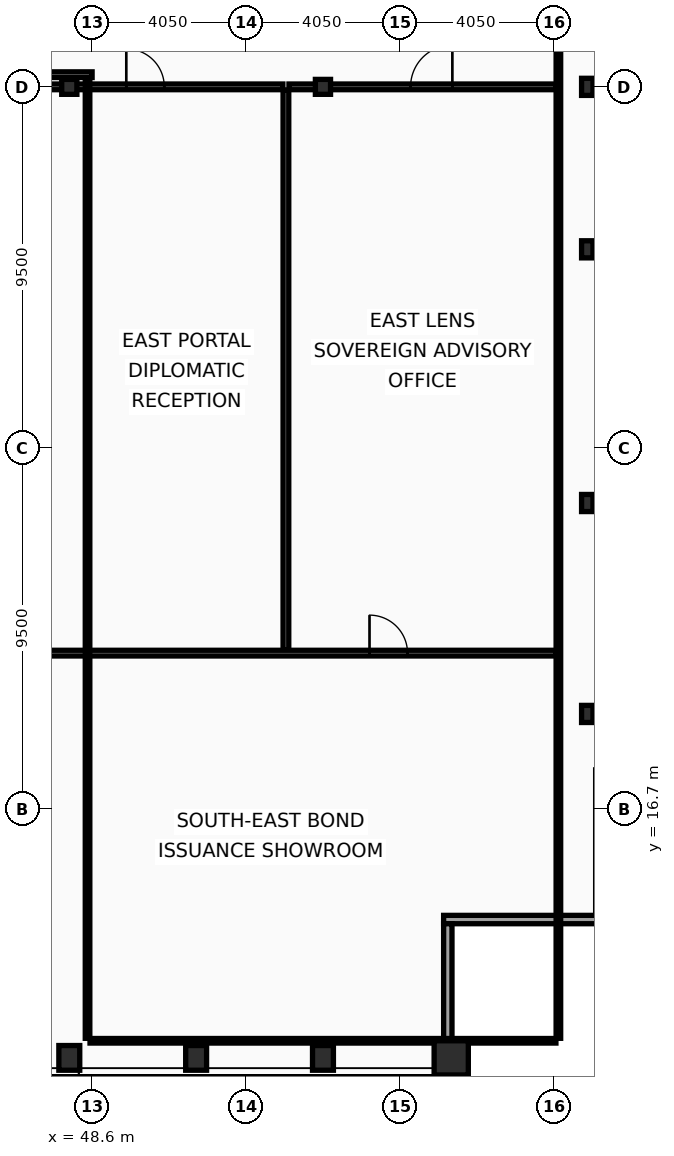
"""IFC4 building model, lengths in metres.
Left out: names, types, materials, properties, quantities, classifications, styles, units other than length and angle.
Written with IfcOpenShell. Run it as: python <this file> out.ifc"""

import sys

from ifc_helpers import new_model, si_unit, direction, frame, frame_2d, origin, origin_2d, place, context, subcontext, project, spatial, rectangle, hollow_rectangle, i_section, extrude, element, fill, save


model = new_model("IFC4")
c1 = context("Model", 3, precision=1e-05, world=origin(), true_north=direction((0.0, 1.0)))
c2 = subcontext(c1, "Body", "Model", "MODEL_VIEW")
j1 = project(units=[si_unit("LENGTHUNIT", "METRE"), si_unit("PLANEANGLEUNIT", "RADIAN")], contexts=[c1])
p1 = place(None, origin())
s1 = spatial("IfcSite", under=j1, at=p1, CompositionType="ELEMENT")
p2 = place(p1, origin())
s2 = spatial("IfcBuilding", under=s1, at=p2, CompositionType="ELEMENT")
p3 = place(p2, frame((0.0, 0.0, 310.2)))
s3 = spatial("IfcBuildingStorey", under=s2, at=p3, CompositionType="ELEMENT", Elevation=310.2)
p4 = place(p3, frame((58.05, 10.15, 0.0), z_axis=(0.0, 0.0, 1.0), x_axis=(1.0, 0.0, 0.0)))
e1 = element("IfcColumn", 1, at=p4, inside=s3, PredefinedType="COLUMN", context=c2, shape_type="SweptSolid", body=[
    extrude(hollow_rectangle(XDim=0.9, YDim=0.9, WallThickness=0.05, at=origin_2d()), origin(), (0.0, 0.0, 1.0), 4.4),
])
for number, where, z_axis, x_axis in (
    (2, (48.0, 10.15, 0.0), (0.0, 0.0, 1.0), (1.0, 0.0, 0.0)),
    (3, (51.337, 10.15, 0.0), (0.0, 0.0, 1.0), (1.0, 0.0, 0.0)),
    (4, (54.675, 10.15, 0.0), (0.0, 0.0, 1.0), (1.0, 0.0, 0.0)),
):
    element("IfcColumn", number, at=place(p3, frame(where, z_axis=z_axis, x_axis=x_axis)), inside=s3, PredefinedType="COLUMN", context=c2, shape_type="SweptSolid", body=[
        extrude(hollow_rectangle(XDim=0.55, YDim=0.65, WallThickness=0.04, at=origin_2d()), origin(), (0.0, 0.0, 1.0), 4.4),
    ])
for number, where, z_axis, x_axis in (
    (5, (61.63, 19.2, 0.0), (0.0, 0.0, 1.0), (1.0, 0.0, 0.0)),
    (6, (61.63, 24.75, 0.0), (0.0, 0.0, 1.0), (1.0, 0.0, 0.0)),
    (7, (61.63, 31.425, 0.0), (0.0, 0.0, 1.0), (1.0, 0.0, 0.0)),
    (8, (61.63, 35.7, 0.0), (0.0, 0.0, 1.0), (1.0, 0.0, 0.0)),
):
    element("IfcColumn", number, at=place(p3, frame(where, z_axis=z_axis, x_axis=x_axis)), inside=s3, PredefinedType="COLUMN", context=c2, shape_type="SweptSolid", body=[
        extrude(i_section(OverallWidth=0.3, OverallDepth=0.45, WebThickness=0.014, FlangeThickness=0.026, at=origin_2d()), origin(), (0.0, 0.0, 1.0), 4.4),
    ])
for number, where, z_axis, x_axis in (
    (9, (48.0, 35.7, 0.0), (0.0, 0.0, 1.0), (1.0, 0.0, 0.0)),
    (10, (54.675, 35.7, 0.0), (0.0, 0.0, 1.0), (1.0, 0.0, 0.0)),
):
    element("IfcColumn", number, at=place(p3, frame(where, z_axis=z_axis, x_axis=x_axis)), inside=s3, PredefinedType="COLUMN", context=c2, shape_type="SweptSolid", body=[
        extrude(i_section(OverallWidth=0.399, OverallDepth=0.393, WebThickness=0.023, FlangeThickness=0.037, at=origin_2d()), origin(), (0.0, 0.0, 1.0), 4.4),
    ])
p5 = place(p3, frame((62.07, 13.79, 0.0), z_axis=(0.0, 0.0, 1.0), x_axis=(-1.0, 0.0, 0.0)))
e11 = element("IfcWall", 11, at=p5, inside=s3, PredefinedType="SOLIDWALL", context=c2, shape_type="SweptSolid", body=[
    extrude(rectangle(XDim=4.22, YDim=0.22, at=frame_2d((2.11, 0.0))), origin(), (0.0, 0.0, 1.0), 3.68),
])
p6 = place(p3, frame((57.96, 13.68, 0.0), z_axis=(0.0, 0.0, 1.0), x_axis=(0.0, -1.0, 0.0)))
e12 = element("IfcWall", 12, at=p6, inside=s3, PredefinedType="SOLIDWALL", context=c2, shape_type="SweptSolid", body=[
    extrude(rectangle(XDim=3.91, YDim=0.22, at=frame_2d((1.955, 0.0))), origin(), (0.0, 0.0, 1.0), 3.68),
])
p7 = place(p3, frame((46.7, 35.7, 0.0), z_axis=(0.0, 0.0, 1.0), x_axis=(1.0, 0.0, 0.0)))
e13 = element("IfcWall", 13, at=p7, inside=s3, PredefinedType="PARTITIONING", context=c2, shape_type="SweptSolid", body=[
    extrude(rectangle(XDim=6.92, YDim=0.15, at=frame_2d((3.46, 0.0))), origin(), (0.0, 0.0, 1.0), 3.63),
])
p8 = place(p7, frame((2.8, 0.0, 0.0)))
e14 = element("IfcOpeningElement", 14, at=p8, cuts=e13, PredefinedType="OPENING", context=c2, shape_type="SweptSolid", body=[
    extrude(rectangle(XDim=1.0, YDim=2.05, at=frame_2d((0.5, 1.025))), frame((0.0, 0.085, 0.0), z_axis=(0.0, -1.0, 0.0), x_axis=(1.0, 0.0, 0.0)), (0.0, 0.0, 1.0), 0.17),
])
p9 = place(p3, frame((53.78, 35.7, 0.0), z_axis=(0.0, 0.0, 1.0), x_axis=(1.0, 0.0, 0.0)))
e15 = element("IfcWall", 15, at=p9, inside=s3, PredefinedType="PARTITIONING", context=c2, shape_type="SweptSolid", body=[
    extrude(rectangle(XDim=7.025, YDim=0.15, at=frame_2d((3.512, 0.0))), origin(), (0.0, 0.0, 1.0), 3.63),
])
p10 = place(p9, frame((3.2, 0.0, 0.0)))
e16 = element("IfcOpeningElement", 16, at=p10, cuts=e15, PredefinedType="OPENING", context=c2, shape_type="SweptSolid", body=[
    extrude(rectangle(XDim=1.1, YDim=2.1, at=frame_2d((0.55, 1.05))), frame((0.0, 0.085, 0.0), z_axis=(0.0, -1.0, 0.0), x_axis=(1.0, 0.0, 0.0)), (0.0, 0.0, 1.0), 0.17),
])
p11 = place(p3, frame((53.7, 20.88, 0.0), z_axis=(0.0, 0.0, 1.0), x_axis=(0.0, 1.0, 0.0)))
e17 = element("IfcWall", 17, at=p11, inside=s3, PredefinedType="PARTITIONING", context=c2, shape_type="SweptSolid", body=[
    extrude(rectangle(XDim=14.74, YDim=0.15, at=frame_2d((7.37, 0.0))), origin(), (0.0, 0.0, 1.0), 3.87),
])
p12 = place(p3, frame((46.7, 20.8, 0.0), z_axis=(0.0, 0.0, 1.0), x_axis=(1.0, 0.0, 0.0)))
e18 = element("IfcWall", 18, at=p12, inside=s3, PredefinedType="PARTITIONING", context=c2, shape_type="SweptSolid", body=[
    extrude(rectangle(XDim=14.105, YDim=0.15, at=frame_2d((7.052, 0.0))), origin(), (0.0, 0.0, 1.0), 3.63),
])
p13 = place(p12, frame((9.2, 0.0, 0.0)))
e19 = element("IfcOpeningElement", 19, at=p13, cuts=e18, PredefinedType="OPENING", context=c2, shape_type="SweptSolid", body=[
    extrude(rectangle(XDim=1.0, YDim=2.05, at=frame_2d((0.5, 1.025))), frame((0.0, 0.085, 0.0), z_axis=(0.0, -1.0, 0.0), x_axis=(1.0, 0.0, 0.0)), (0.0, 0.0, 1.0), 0.17),
])
p14 = place(p3, frame((24.3, 36.02, 0.0), z_axis=(0.0, 0.0, 1.0), x_axis=(1.0, 0.0, 0.0)))
e20 = element("IfcWall", 20, at=p14, inside=s3, PredefinedType="PARTITIONING", context=c2, shape_type="SweptSolid", body=[
    extrude(rectangle(XDim=24.3, YDim=0.15, at=frame_2d((12.15, 0.0))), origin(), (0.0, 0.0, 1.0), 3.63),
])
p15 = place(p3, frame((60.87, 10.665, 0.0), z_axis=(0.0, 0.0, 1.0), x_axis=(0.0, 1.0, 0.0)))
e21 = element("IfcWall", 21, at=p15, inside=s3, PredefinedType="PARTITIONING", context=c2, shape_type="SweptSolid", body=[
    extrude(rectangle(XDim=42.11, YDim=0.12, at=frame_2d((21.055, 0.0))), origin(), (0.0, 0.0, 1.0), 3.63),
])
p16 = place(p3, frame((48.545, 10.6, 0.0), z_axis=(0.0, 0.0, 1.0), x_axis=(1.0, 0.0, 0.0)))
e22 = element("IfcWall", 22, at=p16, inside=s3, PredefinedType="PARTITIONING", context=c2, shape_type="SweptSolid", body=[
    extrude(rectangle(XDim=12.26, YDim=0.12, at=frame_2d((6.13, 0.0))), origin(), (0.0, 0.0, 1.0), 3.63),
])
p17 = place(p3, frame((48.48, 10.665, 0.0), z_axis=(0.0, 0.0, 1.0), x_axis=(0.0, 1.0, 0.0)))
e23 = element("IfcWall", 23, at=p17, inside=s3, PredefinedType="PARTITIONING", context=c2, shape_type="SweptSolid", body=[
    extrude(rectangle(XDim=25.275, YDim=0.12, at=frame_2d((12.637, 0.0))), origin(), (0.0, 0.0, 1.0), 3.63),
])
p18 = place(p8, origin())
e24 = element("IfcDoor", 24, at=p18, inside=s3, OperationType="SINGLE_SWING_LEFT", PredefinedType="DOOR", context=c2, shape_type="SweptSolid", body=[
    extrude(rectangle(XDim=1.0, YDim=2.05, at=frame_2d((0.5, 1.025))), frame((0.0, 0.025, 0.0), z_axis=(0.0, -1.0, 0.0), x_axis=(1.0, 0.0, 0.0)), (0.0, 0.0, 1.0), 0.05),
])
fill(e14, e24)
p19 = place(p10, origin())
e25 = element("IfcDoor", 25, at=p19, inside=s3, OperationType="SINGLE_SWING_RIGHT", PredefinedType="DOOR", context=c2, shape_type="SweptSolid", body=[
    extrude(rectangle(XDim=1.1, YDim=2.1, at=frame_2d((0.55, 1.05))), frame((0.0, 0.025, 0.0), z_axis=(0.0, -1.0, 0.0), x_axis=(1.0, 0.0, 0.0)), (0.0, 0.0, 1.0), 0.05),
])
fill(e16, e25)
p20 = place(p13, origin())
e26 = element("IfcDoor", 26, at=p20, inside=s3, OperationType="SINGLE_SWING_LEFT", PredefinedType="DOOR", context=c2, shape_type="SweptSolid", body=[
    extrude(rectangle(XDim=1.0, YDim=2.05, at=frame_2d((0.5, 1.025))), frame((0.0, 0.025, 0.0), z_axis=(0.0, -1.0, 0.0), x_axis=(1.0, 0.0, 0.0)), (0.0, 0.0, 1.0), 0.05),
])
fill(e19, e26)
save(model, sys.argv[1])
